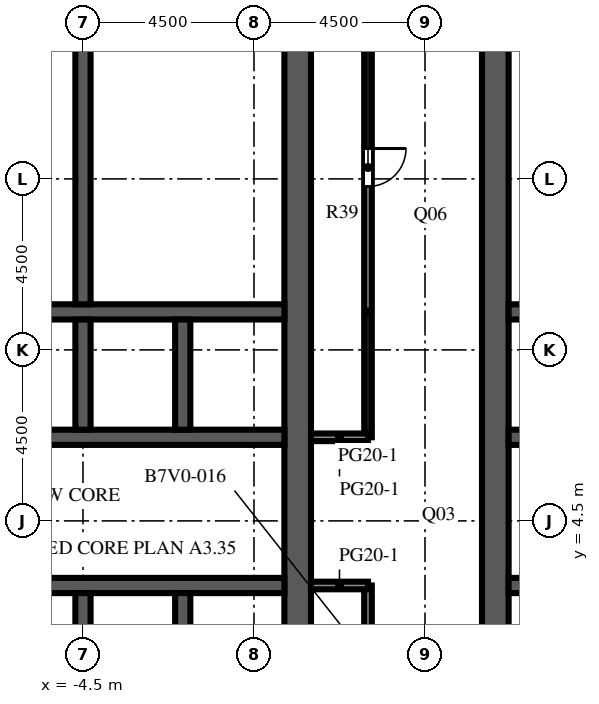
"""IFC4 building model, lengths in metres.
Left out: names, types, materials, properties, quantities, classifications, styles, units other than length and angle.
Written with IfcOpenShell. Run it as: python <this file> out.ifc"""

import sys

from ifc_helpers import new_model, si_unit, direction, frame, frame_2d, origin, place, context, subcontext, project, spatial, rectangle, extrude, element, fill, save


model = new_model("IFC4")
c1 = context("Model", 3, precision=1e-05, world=origin(), true_north=direction((0.0, 1.0)))
c2 = subcontext(c1, "Body", "Model", "MODEL_VIEW")
j1 = project(units=[si_unit("LENGTHUNIT", "METRE"), si_unit("PLANEANGLEUNIT", "RADIAN")], contexts=[c1])
p1 = place(None, origin())
s1 = spatial("IfcSite", under=j1, at=p1, CompositionType="ELEMENT")
p2 = place(p1, origin())
s2 = spatial("IfcBuilding", under=s1, at=p2, CompositionType="ELEMENT")
p3 = place(p2, frame((0.0, 0.0, 239.8)))
s3 = spatial("IfcBuildingStorey", under=s2, at=p3, CompositionType="ELEMENT", Elevation=239.8)
p4 = place(p3, frame((1.15, -9.0, 0.0), z_axis=(0.0, 0.0, 1.0), x_axis=(0.0, 1.0, 0.0)))
e1 = element("IfcWall", 1, at=p4, inside=s3, PredefinedType="SHEAR", context=c2, shape_type="SweptSolid", body=[
    extrude(rectangle(XDim=27.5, YDim=0.7, at=frame_2d((13.75, 0.0))), origin(), (0.0, 0.0, 1.0), 4.1),
])
p5 = place(p4, frame((12.55, 0.0, 0.0)))
e2 = element("IfcOpeningElement", 2, at=p5, cuts=e1, PredefinedType="OPENING", context=c2, shape_type="SweptSolid", body=[
    extrude(rectangle(XDim=2.4, YDim=2.4, at=frame_2d((1.2, 1.2))), frame((0.0, 0.36, 0.0), z_axis=(0.0, -1.0, 0.0), x_axis=(1.0, 0.0, 0.0)), (0.0, 0.0, 1.0), 0.72),
])
p6 = place(p4, frame((5.42, 0.0, 0.0)))
e3 = element("IfcOpeningElement", 3, at=p6, cuts=e1, PredefinedType="OPENING", context=c2, shape_type="SweptSolid", body=[
    extrude(rectangle(XDim=1.2, YDim=2.1, at=frame_2d((0.6, 1.05))), frame((0.0, 0.36, 0.0), z_axis=(0.0, -1.0, 0.0), x_axis=(1.0, 0.0, 0.0)), (0.0, 0.0, 1.0), 0.72),
])
p7 = place(p4, frame((19.46, 0.0, 0.0)))
e4 = element("IfcOpeningElement", 4, at=p7, cuts=e1, PredefinedType="OPENING", context=c2, shape_type="SweptSolid", body=[
    extrude(rectangle(XDim=1.0, YDim=2.1, at=frame_2d((0.5, 1.05))), frame((0.0, 0.36, 0.0), z_axis=(0.0, -1.0, 0.0), x_axis=(1.0, 0.0, 0.0)), (0.0, 0.0, 1.0), 0.72),
])
p8 = place(p4, frame((21.17, 0.0, 0.0)))
e5 = element("IfcOpeningElement", 5, at=p8, cuts=e1, PredefinedType="OPENING", context=c2, shape_type="SweptSolid", body=[
    extrude(rectangle(XDim=1.0, YDim=2.1, at=frame_2d((0.5, 1.05))), frame((0.0, 0.36, 0.0), z_axis=(0.0, -1.0, 0.0), x_axis=(1.0, 0.0, 0.0)), (0.0, 0.0, 1.0), 0.72),
])
p9 = place(p4, frame((23.26, 0.0, 0.0)))
e6 = element("IfcOpeningElement", 6, at=p9, cuts=e1, PredefinedType="OPENING", context=c2, shape_type="SweptSolid", body=[
    extrude(rectangle(XDim=1.0, YDim=2.1, at=frame_2d((0.5, 1.05))), frame((0.0, 0.36, 0.0), z_axis=(0.0, -1.0, 0.0), x_axis=(1.0, 0.0, 0.0)), (0.0, 0.0, 1.0), 0.72),
])
p10 = place(p4, frame((25.35, 0.0, 0.0)))
e7 = element("IfcOpeningElement", 7, at=p10, cuts=e1, PredefinedType="OPENING", context=c2, shape_type="SweptSolid", body=[
    extrude(rectangle(XDim=1.0, YDim=2.1, at=frame_2d((0.5, 1.05))), frame((0.0, 0.36, 0.0), z_axis=(0.0, -1.0, 0.0), x_axis=(1.0, 0.0, 0.0)), (0.0, 0.0, 1.0), 0.72),
])
p11 = place(p3, frame((-9.8, 2.8, 0.0), z_axis=(0.0, 0.0, 1.0), x_axis=(1.0, 0.0, 0.0)))
e8 = element("IfcWall", 8, at=p11, inside=s3, PredefinedType="SHEAR", context=c2, shape_type="SweptSolid", body=[
    extrude(rectangle(XDim=10.6, YDim=0.4, at=frame_2d((5.3, 0.0))), origin(), (0.0, 0.0, 1.0), 4.1),
])
p12 = place(p11, frame((0.688, 0.0, 0.0)))
e9 = element("IfcOpeningElement", 9, at=p12, cuts=e8, PredefinedType="OPENING", context=c2, shape_type="SweptSolid", body=[
    extrude(rectangle(XDim=1.1, YDim=2.1, at=frame_2d((0.55, 1.05))), frame((0.0, 0.21, 0.0), z_axis=(0.0, -1.0, 0.0), x_axis=(1.0, 0.0, 0.0)), (0.0, 0.0, 1.0), 0.42),
])
p13 = place(p11, frame((3.438, 0.0, 0.0)))
e10 = element("IfcOpeningElement", 10, at=p13, cuts=e8, PredefinedType="OPENING", context=c2, shape_type="SweptSolid", body=[
    extrude(rectangle(XDim=1.1, YDim=2.1, at=frame_2d((0.55, 1.05))), frame((0.0, 0.21, 0.0), z_axis=(0.0, -1.0, 0.0), x_axis=(1.0, 0.0, 0.0)), (0.0, 0.0, 1.0), 0.42),
])
p14 = place(p11, frame((6.113, 0.0, 0.0)))
e11 = element("IfcOpeningElement", 11, at=p14, cuts=e8, PredefinedType="OPENING", context=c2, shape_type="SweptSolid", body=[
    extrude(rectangle(XDim=1.0, YDim=2.1, at=frame_2d((0.5, 1.05))), frame((0.0, 0.21, 0.0), z_axis=(0.0, -1.0, 0.0), x_axis=(1.0, 0.0, 0.0)), (0.0, 0.0, 1.0), 0.42),
])
p15 = place(p11, frame((8.863, 0.0, 0.0)))
e12 = element("IfcOpeningElement", 12, at=p15, cuts=e8, PredefinedType="OPENING", context=c2, shape_type="SweptSolid", body=[
    extrude(rectangle(XDim=1.0, YDim=2.1, at=frame_2d((0.5, 1.05))), frame((0.0, 0.21, 0.0), z_axis=(0.0, -1.0, 0.0), x_axis=(1.0, 0.0, 0.0)), (0.0, 0.0, 1.0), 0.42),
])
p16 = place(p3, frame((-9.8, 6.7, 0.0), z_axis=(0.0, 0.0, 1.0), x_axis=(1.0, 0.0, 0.0)))
e13 = element("IfcWall", 13, at=p16, inside=s3, PredefinedType="SHEAR", context=c2, shape_type="SweptSolid", body=[
    extrude(rectangle(XDim=10.6, YDim=0.4, at=frame_2d((5.3, 0.0))), origin(), (0.0, 0.0, 1.0), 4.1),
])
p17 = place(p16, frame((3.438, 0.0, 0.0)))
e14 = element("IfcOpeningElement", 14, at=p17, cuts=e13, PredefinedType="OPENING", context=c2, shape_type="SweptSolid", body=[
    extrude(rectangle(XDim=1.1, YDim=2.1, at=frame_2d((0.55, 1.05))), frame((0.0, 0.21, 0.0), z_axis=(0.0, -1.0, 0.0), x_axis=(1.0, 0.0, 0.0)), (0.0, 0.0, 1.0), 0.42),
])
p18 = place(p16, frame((6.062, 0.0, 0.0)))
e15 = element("IfcOpeningElement", 15, at=p18, cuts=e13, PredefinedType="OPENING", context=c2, shape_type="SweptSolid", body=[
    extrude(rectangle(XDim=1.1, YDim=2.1, at=frame_2d((0.55, 1.05))), frame((0.0, 0.21, 0.0), z_axis=(0.0, -1.0, 0.0), x_axis=(1.0, 0.0, 0.0)), (0.0, 0.0, 1.0), 0.42),
])
p19 = place(p16, frame((8.812, 0.0, 0.0)))
e16 = element("IfcOpeningElement", 16, at=p19, cuts=e13, PredefinedType="OPENING", context=c2, shape_type="SweptSolid", body=[
    extrude(rectangle(XDim=1.1, YDim=2.1, at=frame_2d((0.55, 1.05))), frame((0.0, 0.21, 0.0), z_axis=(0.0, -1.0, 0.0), x_axis=(1.0, 0.0, 0.0)), (0.0, 0.0, 1.0), 0.42),
])
p20 = place(p16, frame((0.738, 0.0, 0.0)))
e17 = element("IfcOpeningElement", 17, at=p20, cuts=e13, PredefinedType="OPENING", context=c2, shape_type="SweptSolid", body=[
    extrude(rectangle(XDim=1.0, YDim=2.1, at=frame_2d((0.5, 1.05))), frame((0.0, 0.21, 0.0), z_axis=(0.0, -1.0, 0.0), x_axis=(1.0, 0.0, 0.0)), (0.0, 0.0, 1.0), 0.42),
])
p21 = place(p3, frame((-9.8, 10.0, 0.0), z_axis=(0.0, 0.0, 1.0), x_axis=(1.0, 0.0, 0.0)))
e18 = element("IfcWall", 18, at=p21, inside=s3, PredefinedType="SHEAR", context=c2, shape_type="SweptSolid", body=[
    extrude(rectangle(XDim=10.6, YDim=0.4, at=frame_2d((5.3, 0.0))), origin(), (0.0, 0.0, 1.0), 4.1),
])
for number, where, z_axis, x_axis in (
    (19, (-4.5, -0.3, 0.0), (0.0, 0.0, 1.0), (0.0, 1.0, 0.0)),
    (20, (-4.5, 6.9, 0.0), (0.0, 0.0, 1.0), (0.0, 1.0, 0.0)),
    (21, (-1.875, -0.3, 0.0), (0.0, 0.0, 1.0), (0.0, 1.0, 0.0)),
    (22, (-1.875, 6.9, 0.0), (0.0, 0.0, 1.0), (0.0, 1.0, 0.0)),
):
    element("IfcWall", number, at=place(p3, frame(where, z_axis=z_axis, x_axis=x_axis)), inside=s3, PredefinedType="SHEAR", context=c2, shape_type="SweptSolid", body=[
        extrude(rectangle(XDim=2.9, YDim=0.4, at=frame_2d((1.45, 0.0))), origin(), (0.0, 0.0, 1.0), 4.1),
    ])
p22 = place(p3, frame((-4.5, 10.2, 0.0), z_axis=(0.0, 0.0, 1.0), x_axis=(0.0, 1.0, 0.0)))
e23 = element("IfcWall", 23, at=p22, inside=s3, PredefinedType="SHEAR", context=c2, shape_type="SweptSolid", body=[
    extrude(rectangle(XDim=7.6, YDim=0.4, at=frame_2d((3.8, 0.0))), origin(), (0.0, 0.0, 1.0), 4.1),
])
p23 = place(p3, frame((6.35, -9.0, 0.0), z_axis=(0.0, 0.0, 1.0), x_axis=(0.0, 1.0, 0.0)))
e24 = element("IfcWall", 24, at=p23, inside=s3, PredefinedType="SHEAR", context=c2, shape_type="SweptSolid", body=[
    extrude(rectangle(XDim=27.5, YDim=0.7, at=frame_2d((13.75, 0.0))), origin(), (0.0, 0.0, 1.0), 4.1),
])
p24 = place(p23, frame((12.55, 0.0, 0.0)))
e25 = element("IfcOpeningElement", 25, at=p24, cuts=e24, PredefinedType="OPENING", context=c2, shape_type="SweptSolid", body=[
    extrude(rectangle(XDim=2.4, YDim=2.4, at=frame_2d((1.2, 1.2))), frame((0.0, 0.36, 0.0), z_axis=(0.0, -1.0, 0.0), x_axis=(1.0, 0.0, 0.0)), (0.0, 0.0, 1.0), 0.72),
])
p25 = place(p23, frame((5.42, 0.0, 0.0)))
e26 = element("IfcOpeningElement", 26, at=p25, cuts=e24, PredefinedType="OPENING", context=c2, shape_type="SweptSolid", body=[
    extrude(rectangle(XDim=1.2, YDim=2.1, at=frame_2d((0.6, 1.05))), frame((0.0, 0.36, 0.0), z_axis=(0.0, -1.0, 0.0), x_axis=(1.0, 0.0, 0.0)), (0.0, 0.0, 1.0), 0.72),
])
p26 = place(p23, frame((19.46, 0.0, 0.0)))
e27 = element("IfcOpeningElement", 27, at=p26, cuts=e24, PredefinedType="OPENING", context=c2, shape_type="SweptSolid", body=[
    extrude(rectangle(XDim=1.0, YDim=2.1, at=frame_2d((0.5, 1.05))), frame((0.0, 0.36, 0.0), z_axis=(0.0, -1.0, 0.0), x_axis=(1.0, 0.0, 0.0)), (0.0, 0.0, 1.0), 0.72),
])
p27 = place(p23, frame((21.17, 0.0, 0.0)))
e28 = element("IfcOpeningElement", 28, at=p27, cuts=e24, PredefinedType="OPENING", context=c2, shape_type="SweptSolid", body=[
    extrude(rectangle(XDim=1.0, YDim=2.1, at=frame_2d((0.5, 1.05))), frame((0.0, 0.36, 0.0), z_axis=(0.0, -1.0, 0.0), x_axis=(1.0, 0.0, 0.0)), (0.0, 0.0, 1.0), 0.72),
])
p28 = place(p23, frame((23.26, 0.0, 0.0)))
e29 = element("IfcOpeningElement", 29, at=p28, cuts=e24, PredefinedType="OPENING", context=c2, shape_type="SweptSolid", body=[
    extrude(rectangle(XDim=1.0, YDim=2.1, at=frame_2d((0.5, 1.05))), frame((0.0, 0.36, 0.0), z_axis=(0.0, -1.0, 0.0), x_axis=(1.0, 0.0, 0.0)), (0.0, 0.0, 1.0), 0.72),
])
p29 = place(p23, frame((25.35, 0.0, 0.0)))
e30 = element("IfcOpeningElement", 30, at=p29, cuts=e24, PredefinedType="OPENING", context=c2, shape_type="SweptSolid", body=[
    extrude(rectangle(XDim=1.0, YDim=2.1, at=frame_2d((0.5, 1.05))), frame((0.0, 0.36, 0.0), z_axis=(0.0, -1.0, 0.0), x_axis=(1.0, 0.0, 0.0)), (0.0, 0.0, 1.0), 0.72),
])
p30 = place(p3, frame((6.7, 2.8, 0.0), z_axis=(0.0, 0.0, 1.0), x_axis=(1.0, 0.0, 0.0)))
e31 = element("IfcWall", 31, at=p30, inside=s3, PredefinedType="SHEAR", context=c2, shape_type="SweptSolid", body=[
    extrude(rectangle(XDim=10.6, YDim=0.4, at=frame_2d((5.3, 0.0))), origin(), (0.0, 0.0, 1.0), 4.1),
])
p31 = place(p30, frame((0.688, 0.0, 0.0)))
e32 = element("IfcOpeningElement", 32, at=p31, cuts=e31, PredefinedType="OPENING", context=c2, shape_type="SweptSolid", body=[
    extrude(rectangle(XDim=1.1, YDim=2.1, at=frame_2d((0.55, 1.05))), frame((0.0, 0.21, 0.0), z_axis=(0.0, -1.0, 0.0), x_axis=(1.0, 0.0, 0.0)), (0.0, 0.0, 1.0), 0.42),
])
p32 = place(p30, frame((3.438, 0.0, 0.0)))
e33 = element("IfcOpeningElement", 33, at=p32, cuts=e31, PredefinedType="OPENING", context=c2, shape_type="SweptSolid", body=[
    extrude(rectangle(XDim=1.1, YDim=2.1, at=frame_2d((0.55, 1.05))), frame((0.0, 0.21, 0.0), z_axis=(0.0, -1.0, 0.0), x_axis=(1.0, 0.0, 0.0)), (0.0, 0.0, 1.0), 0.42),
])
p33 = place(p30, frame((6.113, 0.0, 0.0)))
e34 = element("IfcOpeningElement", 34, at=p33, cuts=e31, PredefinedType="OPENING", context=c2, shape_type="SweptSolid", body=[
    extrude(rectangle(XDim=1.0, YDim=2.1, at=frame_2d((0.5, 1.05))), frame((0.0, 0.21, 0.0), z_axis=(0.0, -1.0, 0.0), x_axis=(1.0, 0.0, 0.0)), (0.0, 0.0, 1.0), 0.42),
])
p34 = place(p30, frame((8.863, 0.0, 0.0)))
e35 = element("IfcOpeningElement", 35, at=p34, cuts=e31, PredefinedType="OPENING", context=c2, shape_type="SweptSolid", body=[
    extrude(rectangle(XDim=1.0, YDim=2.1, at=frame_2d((0.5, 1.05))), frame((0.0, 0.21, 0.0), z_axis=(0.0, -1.0, 0.0), x_axis=(1.0, 0.0, 0.0)), (0.0, 0.0, 1.0), 0.42),
])
p35 = place(p3, frame((6.7, 6.7, 0.0), z_axis=(0.0, 0.0, 1.0), x_axis=(1.0, 0.0, 0.0)))
e36 = element("IfcWall", 36, at=p35, inside=s3, PredefinedType="SHEAR", context=c2, shape_type="SweptSolid", body=[
    extrude(rectangle(XDim=10.6, YDim=0.4, at=frame_2d((5.3, 0.0))), origin(), (0.0, 0.0, 1.0), 4.1),
])
p36 = place(p35, frame((3.438, 0.0, 0.0)))
e37 = element("IfcOpeningElement", 37, at=p36, cuts=e36, PredefinedType="OPENING", context=c2, shape_type="SweptSolid", body=[
    extrude(rectangle(XDim=1.1, YDim=2.1, at=frame_2d((0.55, 1.05))), frame((0.0, 0.21, 0.0), z_axis=(0.0, -1.0, 0.0), x_axis=(1.0, 0.0, 0.0)), (0.0, 0.0, 1.0), 0.42),
])
p37 = place(p35, frame((6.062, 0.0, 0.0)))
e38 = element("IfcOpeningElement", 38, at=p37, cuts=e36, PredefinedType="OPENING", context=c2, shape_type="SweptSolid", body=[
    extrude(rectangle(XDim=1.1, YDim=2.1, at=frame_2d((0.55, 1.05))), frame((0.0, 0.21, 0.0), z_axis=(0.0, -1.0, 0.0), x_axis=(1.0, 0.0, 0.0)), (0.0, 0.0, 1.0), 0.42),
])
p38 = place(p35, frame((8.812, 0.0, 0.0)))
e39 = element("IfcOpeningElement", 39, at=p38, cuts=e36, PredefinedType="OPENING", context=c2, shape_type="SweptSolid", body=[
    extrude(rectangle(XDim=1.1, YDim=2.1, at=frame_2d((0.55, 1.05))), frame((0.0, 0.21, 0.0), z_axis=(0.0, -1.0, 0.0), x_axis=(1.0, 0.0, 0.0)), (0.0, 0.0, 1.0), 0.42),
])
p39 = place(p35, frame((0.738, 0.0, 0.0)))
e40 = element("IfcOpeningElement", 40, at=p39, cuts=e36, PredefinedType="OPENING", context=c2, shape_type="SweptSolid", body=[
    extrude(rectangle(XDim=1.0, YDim=2.1, at=frame_2d((0.5, 1.05))), frame((0.0, 0.21, 0.0), z_axis=(0.0, -1.0, 0.0), x_axis=(1.0, 0.0, 0.0)), (0.0, 0.0, 1.0), 0.42),
])
p40 = place(p3, frame((6.7, 10.0, 0.0), z_axis=(0.0, 0.0, 1.0), x_axis=(1.0, 0.0, 0.0)))
e41 = element("IfcWall", 41, at=p40, inside=s3, PredefinedType="SHEAR", context=c2, shape_type="SweptSolid", body=[
    extrude(rectangle(XDim=10.6, YDim=0.4, at=frame_2d((5.3, 0.0))), origin(), (0.0, 0.0, 1.0), 4.1),
])
for number, where, z_axis, x_axis in (
    (42, (-4.3, 11.72, 0.0), (0.0, 0.0, 1.0), (1.0, 0.0, 0.0)),
    (43, (-4.3, 13.62, 0.0), (0.0, 0.0, 1.0), (1.0, 0.0, 0.0)),
    (44, (-4.3, 15.9, 0.0), (0.0, 0.0, 1.0), (1.0, 0.0, 0.0)),
    (45, (6.7, 11.72, 0.0), (0.0, 0.0, 1.0), (1.0, 0.0, 0.0)),
    (46, (6.7, 13.62, 0.0), (0.0, 0.0, 1.0), (1.0, 0.0, 0.0)),
    (47, (6.7, 15.9, 0.0), (0.0, 0.0, 1.0), (1.0, 0.0, 0.0)),
):
    element("IfcWall", number, at=place(p3, frame(where, z_axis=z_axis, x_axis=x_axis)), inside=s3, PredefinedType="PARTITIONING", context=c2, shape_type="SweptSolid", body=[
        extrude(rectangle(XDim=5.1, YDim=0.1, at=frame_2d((2.55, 0.0))), origin(), (0.0, 0.0, 1.0), 3.65),
    ])
p41 = place(p3, frame((3.0, -2.0, 0.0), z_axis=(0.0, 0.0, 1.0), x_axis=(0.0, 1.0, 0.0)))
e48 = element("IfcWall", 48, at=p41, inside=s3, PredefinedType="PARTITIONING", context=c2, shape_type="SweptSolid", body=[
    extrude(rectangle(XDim=4.8, YDim=0.2, at=frame_2d((2.4, 0.0))), origin(), (0.0, 0.0, 1.0), 3.65),
])
p42 = place(p41, frame((2.35, 0.0, 0.0)))
e49 = element("IfcOpeningElement", 49, at=p42, cuts=e48, PredefinedType="OPENING", context=c2, shape_type="SweptSolid", body=[
    extrude(rectangle(XDim=1.0, YDim=2.1, at=frame_2d((0.5, 1.05))), frame((0.0, 0.11, 0.0), z_axis=(0.0, -1.0, 0.0), x_axis=(1.0, 0.0, 0.0)), (0.0, 0.0, 1.0), 0.22),
])
p43 = place(p3, frame((3.0, 6.7, 0.0), z_axis=(0.0, 0.0, 1.0), x_axis=(0.0, 1.0, 0.0)))
e50 = element("IfcWall", 50, at=p43, inside=s3, PredefinedType="PARTITIONING", context=c2, shape_type="SweptSolid", body=[
    extrude(rectangle(XDim=11.8, YDim=0.2, at=frame_2d((5.9, 0.0))), origin(), (0.0, 0.0, 1.0), 3.65),
])
p44 = place(p43, frame((6.6, 0.0, 0.0)))
e51 = element("IfcOpeningElement", 51, at=p44, cuts=e50, PredefinedType="OPENING", context=c2, shape_type="SweptSolid", body=[
    extrude(rectangle(XDim=1.0, YDim=2.1, at=frame_2d((0.5, 1.05))), frame((0.0, 0.11, 0.0), z_axis=(0.0, -1.0, 0.0), x_axis=(1.0, 0.0, 0.0)), (0.0, 0.0, 1.0), 0.22),
])
for number, where, z_axis, x_axis in (
    (52, (1.5, 2.8, 0.0), (0.0, 0.0, 1.0), (1.0, 0.0, 0.0)),
    (53, (1.5, 6.7, 0.0), (0.0, 0.0, 1.0), (1.0, 0.0, 0.0)),
):
    element("IfcWall", number, at=place(p3, frame(where, z_axis=z_axis, x_axis=x_axis)), inside=s3, PredefinedType="PARTITIONING", context=c2, shape_type="SweptSolid", body=[
        extrude(rectangle(XDim=1.5, YDim=0.2, at=frame_2d((0.75, 0.0))), origin(), (0.0, 0.0, 1.0), 3.65),
    ])
p45 = place(p13, origin())
e54 = element("IfcDoor", 54, at=p45, inside=s3, OperationType="DOUBLE_DOOR_SLIDING", PredefinedType="DOOR", context=c2, shape_type="SweptSolid", body=[
    extrude(rectangle(XDim=1.1, YDim=2.1, at=frame_2d((0.55, 1.05))), frame((0.0, 0.025, 0.0), z_axis=(0.0, -1.0, 0.0), x_axis=(1.0, 0.0, 0.0)), (0.0, 0.0, 1.0), 0.05),
])
fill(e10, e54)
p46 = place(p17, origin())
e55 = element("IfcDoor", 55, at=p46, inside=s3, OperationType="DOUBLE_DOOR_SLIDING", PredefinedType="DOOR", context=c2, shape_type="SweptSolid", body=[
    extrude(rectangle(XDim=1.1, YDim=2.1, at=frame_2d((0.55, 1.05))), frame((0.0, 0.025, 0.0), z_axis=(0.0, -1.0, 0.0), x_axis=(1.0, 0.0, 0.0)), (0.0, 0.0, 1.0), 0.05),
])
fill(e14, e55)
p47 = place(p18, origin())
e56 = element("IfcDoor", 56, at=p47, inside=s3, OperationType="DOUBLE_DOOR_SLIDING", PredefinedType="DOOR", context=c2, shape_type="SweptSolid", body=[
    extrude(rectangle(XDim=1.1, YDim=2.1, at=frame_2d((0.55, 1.05))), frame((0.0, 0.025, 0.0), z_axis=(0.0, -1.0, 0.0), x_axis=(1.0, 0.0, 0.0)), (0.0, 0.0, 1.0), 0.05),
])
fill(e15, e56)
p48 = place(p19, origin())
e57 = element("IfcDoor", 57, at=p48, inside=s3, OperationType="DOUBLE_DOOR_SLIDING", PredefinedType="DOOR", context=c2, shape_type="SweptSolid", body=[
    extrude(rectangle(XDim=1.1, YDim=2.1, at=frame_2d((0.55, 1.05))), frame((0.0, 0.025, 0.0), z_axis=(0.0, -1.0, 0.0), x_axis=(1.0, 0.0, 0.0)), (0.0, 0.0, 1.0), 0.05),
])
fill(e16, e57)
p49 = place(p5, origin())
e58 = element("IfcDoor", 58, at=p49, inside=s3, OperationType="DOUBLE_DOOR_DOUBLE_SWING", PredefinedType="DOOR", context=c2, shape_type="SweptSolid", body=[
    extrude(rectangle(XDim=2.4, YDim=2.4, at=frame_2d((1.2, 1.2))), frame((0.0, 0.025, 0.0), z_axis=(0.0, -1.0, 0.0), x_axis=(1.0, 0.0, 0.0)), (0.0, 0.0, 1.0), 0.05),
])
fill(e2, e58)
p50 = place(p24, origin())
e59 = element("IfcDoor", 59, at=p50, inside=s3, OperationType="DOUBLE_DOOR_DOUBLE_SWING", PredefinedType="DOOR", context=c2, shape_type="SweptSolid", body=[
    extrude(rectangle(XDim=2.4, YDim=2.4, at=frame_2d((1.2, 1.2))), frame((0.0, 0.025, 0.0), z_axis=(0.0, -1.0, 0.0), x_axis=(1.0, 0.0, 0.0)), (0.0, 0.0, 1.0), 0.05),
])
fill(e25, e59)
p51 = place(p14, origin())
e60 = element("IfcDoor", 60, at=p51, inside=s3, OperationType="SINGLE_SWING_LEFT", PredefinedType="DOOR", context=c2, shape_type="SweptSolid", body=[
    extrude(rectangle(XDim=1.0, YDim=2.1, at=frame_2d((0.5, 1.05))), frame((0.0, 0.025, 0.0), z_axis=(0.0, -1.0, 0.0), x_axis=(1.0, 0.0, 0.0)), (0.0, 0.0, 1.0), 0.05),
])
fill(e11, e60)
p52 = place(p15, origin())
e61 = element("IfcDoor", 61, at=p52, inside=s3, OperationType="SINGLE_SWING_RIGHT", PredefinedType="DOOR", context=c2, shape_type="SweptSolid", body=[
    extrude(rectangle(XDim=1.0, YDim=2.1, at=frame_2d((0.5, 1.05))), frame((0.0, 0.025, 0.0), z_axis=(0.0, -1.0, 0.0), x_axis=(1.0, 0.0, 0.0)), (0.0, 0.0, 1.0), 0.05),
])
fill(e12, e61)
p53 = place(p7, origin())
e62 = element("IfcDoor", 62, at=p53, inside=s3, OperationType="SINGLE_SWING_LEFT", PredefinedType="DOOR", context=c2, shape_type="SweptSolid", body=[
    extrude(rectangle(XDim=1.0, YDim=2.1, at=frame_2d((0.5, 1.05))), frame((0.0, 0.325, 0.0), z_axis=(0.0, -1.0, 0.0), x_axis=(1.0, 0.0, 0.0)), (0.0, 0.0, 1.0), 0.05),
])
fill(e4, e62)
p54 = place(p8, origin())
e63 = element("IfcDoor", 63, at=p54, inside=s3, OperationType="SINGLE_SWING_RIGHT", PredefinedType="DOOR", context=c2, shape_type="SweptSolid", body=[
    extrude(rectangle(XDim=1.0, YDim=2.1, at=frame_2d((0.5, 1.05))), frame((0.0, 0.325, 0.0), z_axis=(0.0, -1.0, 0.0), x_axis=(1.0, 0.0, 0.0)), (0.0, 0.0, 1.0), 0.05),
])
fill(e5, e63)
p55 = place(p9, origin())
e64 = element("IfcDoor", 64, at=p55, inside=s3, OperationType="SINGLE_SWING_LEFT", PredefinedType="DOOR", context=c2, shape_type="SweptSolid", body=[
    extrude(rectangle(XDim=1.0, YDim=2.1, at=frame_2d((0.5, 1.05))), frame((0.0, 0.325, 0.0), z_axis=(0.0, -1.0, 0.0), x_axis=(1.0, 0.0, 0.0)), (0.0, 0.0, 1.0), 0.05),
])
fill(e6, e64)
p56 = place(p10, origin())
e65 = element("IfcDoor", 65, at=p56, inside=s3, OperationType="SINGLE_SWING_RIGHT", PredefinedType="DOOR", context=c2, shape_type="SweptSolid", body=[
    extrude(rectangle(XDim=1.0, YDim=2.1, at=frame_2d((0.5, 1.05))), frame((0.0, 0.325, 0.0), z_axis=(0.0, -1.0, 0.0), x_axis=(1.0, 0.0, 0.0)), (0.0, 0.0, 1.0), 0.05),
])
fill(e7, e65)
p57 = place(p26, origin())
e66 = element("IfcDoor", 66, at=p57, inside=s3, OperationType="SINGLE_SWING_RIGHT", PredefinedType="DOOR", context=c2, shape_type="SweptSolid", body=[
    extrude(rectangle(XDim=1.0, YDim=2.1, at=frame_2d((0.5, 1.05))), frame((0.0, -0.275, 0.0), z_axis=(0.0, -1.0, 0.0), x_axis=(1.0, 0.0, 0.0)), (0.0, 0.0, 1.0), 0.05),
])
fill(e27, e66)
p58 = place(p27, origin())
e67 = element("IfcDoor", 67, at=p58, inside=s3, OperationType="SINGLE_SWING_LEFT", PredefinedType="DOOR", context=c2, shape_type="SweptSolid", body=[
    extrude(rectangle(XDim=1.0, YDim=2.1, at=frame_2d((0.5, 1.05))), frame((0.0, -0.275, 0.0), z_axis=(0.0, -1.0, 0.0), x_axis=(1.0, 0.0, 0.0)), (0.0, 0.0, 1.0), 0.05),
])
fill(e28, e67)
p59 = place(p28, origin())
e68 = element("IfcDoor", 68, at=p59, inside=s3, OperationType="SINGLE_SWING_RIGHT", PredefinedType="DOOR", context=c2, shape_type="SweptSolid", body=[
    extrude(rectangle(XDim=1.0, YDim=2.1, at=frame_2d((0.5, 1.05))), frame((0.0, -0.275, 0.0), z_axis=(0.0, -1.0, 0.0), x_axis=(1.0, 0.0, 0.0)), (0.0, 0.0, 1.0), 0.05),
])
fill(e29, e68)
p60 = place(p29, origin())
e69 = element("IfcDoor", 69, at=p60, inside=s3, OperationType="SINGLE_SWING_LEFT", PredefinedType="DOOR", context=c2, shape_type="SweptSolid", body=[
    extrude(rectangle(XDim=1.0, YDim=2.1, at=frame_2d((0.5, 1.05))), frame((0.0, -0.275, 0.0), z_axis=(0.0, -1.0, 0.0), x_axis=(1.0, 0.0, 0.0)), (0.0, 0.0, 1.0), 0.05),
])
fill(e30, e69)
p61 = place(p44, origin())
e70 = element("IfcDoor", 70, at=p61, inside=s3, OperationType="SINGLE_SWING_RIGHT", PredefinedType="DOOR", context=c2, shape_type="SweptSolid", body=[
    extrude(rectangle(XDim=1.0, YDim=2.1, at=frame_2d((0.5, 1.05))), frame((0.0, 0.025, 0.0), z_axis=(0.0, -1.0, 0.0), x_axis=(1.0, 0.0, 0.0)), (0.0, 0.0, 1.0), 0.05),
])
fill(e51, e70)
save(model, sys.argv[1])
